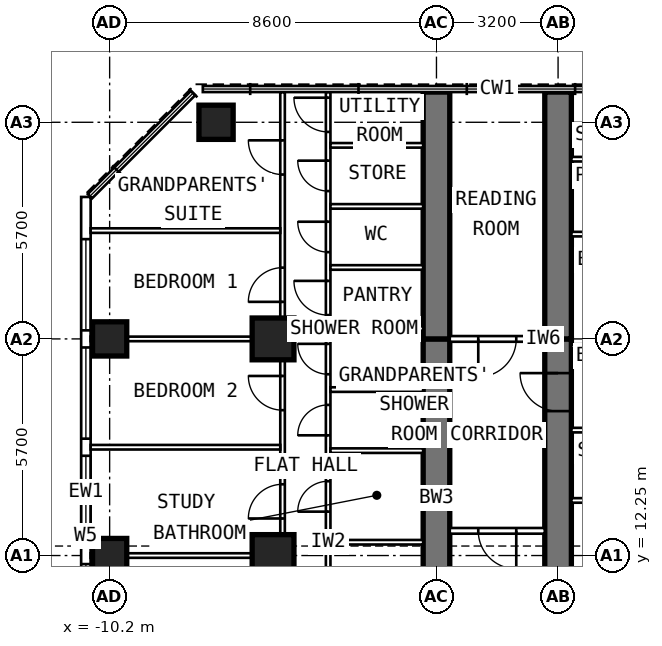
"""IFC4 building model, lengths in metres.
Left out: names, types, materials, properties, quantities, classifications, styles, units other than length and angle.
Written with IfcOpenShell. Run it as: python <this file> out.ifc"""

import sys

from ifc_helpers import new_model, si_unit, direction, frame, frame_2d, origin, origin_2d, place, context, subcontext, project, spatial, rectangle, extrude, element, fill, save


model = new_model("IFC4")
c1 = context("Model", 3, precision=1e-05, world=origin(), true_north=direction((0.0, 1.0)))
c2 = subcontext(c1, "Body", "Model", "MODEL_VIEW")
j1 = project(units=[si_unit("LENGTHUNIT", "METRE"), si_unit("PLANEANGLEUNIT", "RADIAN")], contexts=[c1])
p1 = place(None, origin())
s1 = spatial("IfcSite", under=j1, at=p1, CompositionType="ELEMENT")
p2 = place(p1, origin())
s2 = spatial("IfcBuilding", under=s1, at=p2, CompositionType="ELEMENT")
p3 = place(p2, frame((0.0, 0.0, 222.6)))
s3 = spatial("IfcBuildingStorey", under=s2, at=p3, CompositionType="ELEMENT", Elevation=222.6)
for number, where, z_axis, x_axis in (
    (1, (-10.2, 12.25, 0.0), (0.0, 0.0, 1.0), (0.0, 1.0, 0.0)),
    (2, (-10.2, 17.95, 0.0), (0.0, 0.0, 1.0), (0.0, 1.0, 0.0)),
    (3, (-7.4, 23.65, 0.0), (0.0, 0.0, 1.0), (0.0, 1.0, 0.0)),
):
    element("IfcColumn", number, at=place(p3, frame(where, z_axis=z_axis, x_axis=x_axis)), inside=s3, PredefinedType="COLUMN", context=c2, shape_type="SweptSolid", body=[
        extrude(rectangle(XDim=0.9, YDim=0.9, at=origin_2d()), origin(), (0.0, 0.0, 1.0), 3.6),
    ])
for number, where, z_axis, x_axis in (
    (4, (-5.9, 12.25, 0.0), (0.0, 0.0, 1.0), (0.0, 1.0, 0.0)),
    (5, (-5.9, 17.95, 0.0), (0.0, 0.0, 1.0), (0.0, 1.0, 0.0)),
):
    element("IfcColumn", number, at=place(p3, frame(where, z_axis=z_axis, x_axis=x_axis)), inside=s3, PredefinedType="COLUMN", context=c2, shape_type="SweptSolid", body=[
        extrude(rectangle(XDim=1.1, YDim=1.1, at=origin_2d()), origin(), (0.0, 0.0, 1.0), 3.6),
    ])
p4 = place(p3, frame((-1.6, 9.6, 0.0), z_axis=(0.0, 0.0, 1.0), x_axis=(0.0, 1.0, 0.0)))
e6 = element("IfcWall", 6, at=p4, inside=s3, PredefinedType="SHEAR", context=c2, shape_type="SweptSolid", body=[
    extrude(rectangle(XDim=8.35, YDim=0.7, at=frame_2d((4.175, 0.0))), origin(), (0.0, 0.0, 1.0), 3.6),
])
p5 = place(p4, frame((1.3, 0.0, 0.0)))
e7 = element("IfcOpeningElement", 7, at=p5, cuts=e6, PredefinedType="OPENING", context=c2, shape_type="SweptSolid", body=[
    extrude(rectangle(XDim=1.0, YDim=2.1, at=frame_2d((0.5, 1.05))), frame((0.0, 0.362, 0.0), z_axis=(0.0, -1.0, 0.0), x_axis=(1.0, 0.0, 0.0)), (0.0, 0.0, 1.0), 0.724),
])
p6 = place(p3, frame((-1.6, 17.95, 0.0), z_axis=(0.0, 0.0, 1.0), x_axis=(0.0, 1.0, 0.0)))
e8 = element("IfcWall", 8, at=p6, inside=s3, PredefinedType="SHEAR", context=c2, shape_type="SweptSolid", body=[
    extrude(rectangle(XDim=6.495, YDim=0.7, at=frame_2d((3.248, 0.0))), origin(), (0.0, 0.0, 1.0), 3.6),
])
p7 = place(p3, frame((1.6, 9.6, 0.0), z_axis=(0.0, 0.0, 1.0), x_axis=(0.0, 1.0, 0.0)))
e9 = element("IfcWall", 9, at=p7, inside=s3, PredefinedType="SHEAR", context=c2, shape_type="SweptSolid", body=[
    extrude(rectangle(XDim=8.35, YDim=0.7, at=frame_2d((4.175, 0.0))), origin(), (0.0, 0.0, 1.0), 3.6),
])
p8 = place(p7, frame((6.45, 0.0, 0.0)))
e10 = element("IfcOpeningElement", 10, at=p8, cuts=e9, PredefinedType="OPENING", context=c2, shape_type="SweptSolid", body=[
    extrude(rectangle(XDim=1.0, YDim=2.1, at=frame_2d((0.5, 1.05))), frame((0.0, 0.362, 0.0), z_axis=(0.0, -1.0, 0.0), x_axis=(1.0, 0.0, 0.0)), (0.0, 0.0, 1.0), 0.724),
])
p9 = place(p3, frame((1.6, 17.95, 0.0), z_axis=(0.0, 0.0, 1.0), x_axis=(0.0, 1.0, 0.0)))
e11 = element("IfcWall", 11, at=p9, inside=s3, PredefinedType="SHEAR", context=c2, shape_type="SweptSolid", body=[
    extrude(rectangle(XDim=6.495, YDim=0.7, at=frame_2d((3.248, 0.0))), origin(), (0.0, 0.0, 1.0), 3.6),
])
p10 = place(p3, frame((-10.825, 6.148, 0.0), z_axis=(0.0, 0.0, 1.0), x_axis=(0.0, 1.0, 0.0)))
e12 = element("IfcWall", 12, at=p10, inside=s3, PredefinedType="SOLIDWALL", context=c2, shape_type="SweptSolid", body=[
    extrude(rectangle(XDim=15.537, YDim=0.25, at=frame_2d((7.769, 0.0))), origin(), (0.0, 0.0, 1.0), 3.35),
])
p11 = place(p10, frame((0.627, 0.0, 0.8)))
e13 = element("IfcOpeningElement", 13, at=p11, cuts=e12, PredefinedType="OPENING", context=c2, shape_type="SweptSolid", body=[
    extrude(rectangle(XDim=2.4, YDim=1.8, at=frame_2d((1.2, 0.9))), frame((0.0, 0.137, 0.0), z_axis=(0.0, -1.0, 0.0), x_axis=(1.0, 0.0, 0.0)), (0.0, 0.0, 1.0), 0.274),
])
p12 = place(p10, frame((3.477, 0.0, 0.8)))
e14 = element("IfcOpeningElement", 14, at=p12, cuts=e12, PredefinedType="OPENING", context=c2, shape_type="SweptSolid", body=[
    extrude(rectangle(XDim=2.4, YDim=1.8, at=frame_2d((1.2, 0.9))), frame((0.0, 0.137, 0.0), z_axis=(0.0, -1.0, 0.0), x_axis=(1.0, 0.0, 0.0)), (0.0, 0.0, 1.0), 0.274),
])
p13 = place(p10, frame((6.327, 0.0, 0.8)))
e15 = element("IfcOpeningElement", 15, at=p13, cuts=e12, PredefinedType="OPENING", context=c2, shape_type="SweptSolid", body=[
    extrude(rectangle(XDim=2.4, YDim=1.8, at=frame_2d((1.2, 0.9))), frame((0.0, 0.137, 0.0), z_axis=(0.0, -1.0, 0.0), x_axis=(1.0, 0.0, 0.0)), (0.0, 0.0, 1.0), 0.274),
])
p14 = place(p10, frame((9.177, 0.0, 0.8)))
e16 = element("IfcOpeningElement", 16, at=p14, cuts=e12, PredefinedType="OPENING", context=c2, shape_type="SweptSolid", body=[
    extrude(rectangle(XDim=2.4, YDim=1.8, at=frame_2d((1.2, 0.9))), frame((0.0, 0.137, 0.0), z_axis=(0.0, -1.0, 0.0), x_axis=(1.0, 0.0, 0.0)), (0.0, 0.0, 1.0), 0.274),
])
p15 = place(p10, frame((12.027, 0.0, 0.8)))
e17 = element("IfcOpeningElement", 17, at=p15, cuts=e12, PredefinedType="OPENING", context=c2, shape_type="SweptSolid", body=[
    extrude(rectangle(XDim=2.4, YDim=1.8, at=frame_2d((1.2, 0.9))), frame((0.0, 0.137, 0.0), z_axis=(0.0, -1.0, 0.0), x_axis=(1.0, 0.0, 0.0)), (0.0, 0.0, 1.0), 0.274),
])
p16 = place(p3, frame((-4.45, 9.925, 0.0), z_axis=(0.0, 0.0, 1.0), x_axis=(0.0, 1.0, 0.0)))
e18 = element("IfcWall", 18, at=p16, inside=s3, PredefinedType="PARTITIONING", context=c2, shape_type="SweptSolid", body=[
    extrude(rectangle(XDim=14.52, YDim=0.12, at=frame_2d((7.26, 0.0))), origin(), (0.0, 0.0, 1.0), 3.35),
])
p17 = place(p16, frame((0.925, 0.0, 0.0)))
e19 = element("IfcOpeningElement", 19, at=p17, cuts=e18, PredefinedType="OPENING", context=c2, shape_type="SweptSolid", body=[
    extrude(rectangle(XDim=0.9, YDim=2.1, at=frame_2d((0.45, 1.05))), frame((0.0, 0.072, 0.0), z_axis=(0.0, -1.0, 0.0), x_axis=(1.0, 0.0, 0.0)), (0.0, 0.0, 1.0), 0.144),
])
p18 = place(p16, frame((3.48, 0.0, 0.0)))
e20 = element("IfcOpeningElement", 20, at=p18, cuts=e18, PredefinedType="OPENING", context=c2, shape_type="SweptSolid", body=[
    extrude(rectangle(XDim=0.8, YDim=2.1, at=frame_2d((0.4, 1.05))), frame((0.0, 0.072, 0.0), z_axis=(0.0, -1.0, 0.0), x_axis=(1.0, 0.0, 0.0)), (0.0, 0.0, 1.0), 0.144),
])
p19 = place(p16, frame((5.488, 0.0, 0.0)))
e21 = element("IfcOpeningElement", 21, at=p19, cuts=e18, PredefinedType="OPENING", context=c2, shape_type="SweptSolid", body=[
    extrude(rectangle(XDim=0.8, YDim=2.1, at=frame_2d((0.4, 1.05))), frame((0.0, 0.072, 0.0), z_axis=(0.0, -1.0, 0.0), x_axis=(1.0, 0.0, 0.0)), (0.0, 0.0, 1.0), 0.144),
])
p20 = place(p16, frame((7.095, 0.0, 0.0)))
e22 = element("IfcOpeningElement", 22, at=p20, cuts=e18, PredefinedType="OPENING", context=c2, shape_type="SweptSolid", body=[
    extrude(rectangle(XDim=0.8, YDim=2.1, at=frame_2d((0.4, 1.05))), frame((0.0, 0.072, 0.0), z_axis=(0.0, -1.0, 0.0), x_axis=(1.0, 0.0, 0.0)), (0.0, 0.0, 1.0), 0.144),
])
p21 = place(p16, frame((8.652, 0.0, 0.0)))
e23 = element("IfcOpeningElement", 23, at=p21, cuts=e18, PredefinedType="OPENING", context=c2, shape_type="SweptSolid", body=[
    extrude(rectangle(XDim=0.9, YDim=2.1, at=frame_2d((0.45, 1.05))), frame((0.0, 0.072, 0.0), z_axis=(0.0, -1.0, 0.0), x_axis=(1.0, 0.0, 0.0)), (0.0, 0.0, 1.0), 0.144),
])
p22 = place(p16, frame((10.308, 0.0, 0.0)))
e24 = element("IfcOpeningElement", 24, at=p22, cuts=e18, PredefinedType="OPENING", context=c2, shape_type="SweptSolid", body=[
    extrude(rectangle(XDim=0.8, YDim=2.1, at=frame_2d((0.4, 1.05))), frame((0.0, 0.072, 0.0), z_axis=(0.0, -1.0, 0.0), x_axis=(1.0, 0.0, 0.0)), (0.0, 0.0, 1.0), 0.144),
])
p23 = place(p16, frame((11.915, 0.0, 0.0)))
e25 = element("IfcOpeningElement", 25, at=p23, cuts=e18, PredefinedType="OPENING", context=c2, shape_type="SweptSolid", body=[
    extrude(rectangle(XDim=0.8, YDim=2.1, at=frame_2d((0.4, 1.05))), frame((0.0, 0.072, 0.0), z_axis=(0.0, -1.0, 0.0), x_axis=(1.0, 0.0, 0.0)), (0.0, 0.0, 1.0), 0.144),
])
p24 = place(p16, frame((13.472, 0.0, 0.0)))
e26 = element("IfcOpeningElement", 26, at=p24, cuts=e18, PredefinedType="OPENING", context=c2, shape_type="SweptSolid", body=[
    extrude(rectangle(XDim=0.9, YDim=2.1, at=frame_2d((0.45, 1.05))), frame((0.0, 0.072, 0.0), z_axis=(0.0, -1.0, 0.0), x_axis=(1.0, 0.0, 0.0)), (0.0, 0.0, 1.0), 0.144),
])
p25 = place(p3, frame((-5.65, 9.6, 0.0), z_axis=(0.0, 0.0, 1.0), x_axis=(0.0, 1.0, 0.0)))
e27 = element("IfcWall", 27, at=p25, inside=s3, PredefinedType="PARTITIONING", context=c2, shape_type="SweptSolid", body=[
    extrude(rectangle(XDim=14.845, YDim=0.12, at=frame_2d((7.422, 0.0))), origin(), (0.0, 0.0, 1.0), 3.35),
])
p26 = place(p25, frame((1.05, 0.0, 0.0)))
e28 = element("IfcOpeningElement", 28, at=p26, cuts=e27, PredefinedType="OPENING", context=c2, shape_type="SweptSolid", body=[
    extrude(rectangle(XDim=0.9, YDim=2.1, at=frame_2d((0.45, 1.05))), frame((0.0, 0.072, 0.0), z_axis=(0.0, -1.0, 0.0), x_axis=(1.0, 0.0, 0.0)), (0.0, 0.0, 1.0), 0.144),
])
p27 = place(p25, frame((3.625, 0.0, 0.0)))
e29 = element("IfcOpeningElement", 29, at=p27, cuts=e27, PredefinedType="OPENING", context=c2, shape_type="SweptSolid", body=[
    extrude(rectangle(XDim=0.9, YDim=2.1, at=frame_2d((0.45, 1.05))), frame((0.0, 0.072, 0.0), z_axis=(0.0, -1.0, 0.0), x_axis=(1.0, 0.0, 0.0)), (0.0, 0.0, 1.0), 0.144),
])
p28 = place(p25, frame((6.475, 0.0, 0.0)))
e30 = element("IfcOpeningElement", 30, at=p28, cuts=e27, PredefinedType="OPENING", context=c2, shape_type="SweptSolid", body=[
    extrude(rectangle(XDim=0.9, YDim=2.1, at=frame_2d((0.45, 1.05))), frame((0.0, 0.072, 0.0), z_axis=(0.0, -1.0, 0.0), x_axis=(1.0, 0.0, 0.0)), (0.0, 0.0, 1.0), 0.144),
])
p29 = place(p25, frame((9.325, 0.0, 0.0)))
e31 = element("IfcOpeningElement", 31, at=p29, cuts=e27, PredefinedType="OPENING", context=c2, shape_type="SweptSolid", body=[
    extrude(rectangle(XDim=0.9, YDim=2.1, at=frame_2d((0.45, 1.05))), frame((0.0, 0.072, 0.0), z_axis=(0.0, -1.0, 0.0), x_axis=(1.0, 0.0, 0.0)), (0.0, 0.0, 1.0), 0.144),
])
p30 = place(p25, frame((12.675, 0.0, 0.0)))
e32 = element("IfcOpeningElement", 32, at=p30, cuts=e27, PredefinedType="OPENING", context=c2, shape_type="SweptSolid", body=[
    extrude(rectangle(XDim=0.9, YDim=2.1, at=frame_2d((0.45, 1.05))), frame((0.0, 0.072, 0.0), z_axis=(0.0, -1.0, 0.0), x_axis=(1.0, 0.0, 0.0)), (0.0, 0.0, 1.0), 0.144),
])
p31 = place(p3, frame((-5.71, 12.25, 0.0), z_axis=(0.0, 0.0, 1.0), x_axis=(-1.0, 0.0, 0.0)))
e33 = element("IfcWall", 33, at=p31, inside=s3, PredefinedType="PARTITIONING", context=c2, shape_type="SweptSolid", body=[
    extrude(rectangle(XDim=4.99, YDim=0.12, at=frame_2d((2.495, 0.0))), origin(), (0.0, 0.0, 1.0), 2.45),
])
p32 = place(p3, frame((-5.71, 15.1, 0.0), z_axis=(0.0, 0.0, 1.0), x_axis=(-1.0, 0.0, 0.0)))
e34 = element("IfcWall", 34, at=p32, inside=s3, PredefinedType="PARTITIONING", context=c2, shape_type="SweptSolid", body=[
    extrude(rectangle(XDim=4.99, YDim=0.12, at=frame_2d((2.495, 0.0))), origin(), (0.0, 0.0, 1.0), 3.35),
])
p33 = place(p3, frame((-5.71, 17.95, 0.0), z_axis=(0.0, 0.0, 1.0), x_axis=(-1.0, 0.0, 0.0)))
e35 = element("IfcWall", 35, at=p33, inside=s3, PredefinedType="PARTITIONING", context=c2, shape_type="SweptSolid", body=[
    extrude(rectangle(XDim=4.99, YDim=0.12, at=frame_2d((2.495, 0.0))), origin(), (0.0, 0.0, 1.0), 2.45),
])
p34 = place(p3, frame((-5.71, 20.8, 0.0), z_axis=(0.0, 0.0, 1.0), x_axis=(-1.0, 0.0, 0.0)))
e36 = element("IfcWall", 36, at=p34, inside=s3, PredefinedType="PARTITIONING", context=c2, shape_type="SweptSolid", body=[
    extrude(rectangle(XDim=4.99, YDim=0.12, at=frame_2d((2.495, 0.0))), origin(), (0.0, 0.0, 1.0), 3.35),
])
p35 = place(p3, frame((-1.95, 12.6, 0.0), z_axis=(0.0, 0.0, 1.0), x_axis=(-1.0, 0.0, 0.0)))
e37 = element("IfcWall", 37, at=p35, inside=s3, PredefinedType="PARTITIONING", context=c2, shape_type="SweptSolid", body=[
    extrude(rectangle(XDim=2.44, YDim=0.12, at=frame_2d((1.22, 0.0))), origin(), (0.0, 0.0, 1.0), 2.45),
])
for number, where, z_axis, x_axis in (
    (38, (-1.95, 15.01, 0.0), (0.0, 0.0, 1.0), (-1.0, 0.0, 0.0)),
    (39, (-1.95, 16.617, 0.0), (0.0, 0.0, 1.0), (-1.0, 0.0, 0.0)),
):
    element("IfcWall", number, at=place(p3, frame(where, z_axis=z_axis, x_axis=x_axis)), inside=s3, PredefinedType="PARTITIONING", context=c2, shape_type="SweptSolid", body=[
        extrude(rectangle(XDim=2.44, YDim=0.12, at=frame_2d((1.22, 0.0))), origin(), (0.0, 0.0, 1.0), 3.35),
    ])
p36 = place(p3, frame((-1.95, 18.223, 0.0), z_axis=(0.0, 0.0, 1.0), x_axis=(-1.0, 0.0, 0.0)))
e40 = element("IfcWall", 40, at=p36, inside=s3, PredefinedType="PARTITIONING", context=c2, shape_type="SweptSolid", body=[
    extrude(rectangle(XDim=2.44, YDim=0.12, at=frame_2d((1.22, 0.0))), origin(), (0.0, 0.0, 1.0), 2.45),
])
for number, where, z_axis, x_axis in (
    (41, (-1.95, 19.83, 0.0), (0.0, 0.0, 1.0), (-1.0, 0.0, 0.0)),
    (42, (-1.95, 21.437, 0.0), (0.0, 0.0, 1.0), (-1.0, 0.0, 0.0)),
    (43, (-1.95, 23.043, 0.0), (0.0, 0.0, 1.0), (-1.0, 0.0, 0.0)),
    (44, (1.95, 13.7, 0.0), (0.0, 0.0, 1.0), (1.0, 0.0, 0.0)),
    (45, (1.95, 15.55, 0.0), (0.0, 0.0, 1.0), (1.0, 0.0, 0.0)),
):
    element("IfcWall", number, at=place(p3, frame(where, z_axis=z_axis, x_axis=x_axis)), inside=s3, PredefinedType="PARTITIONING", context=c2, shape_type="SweptSolid", body=[
        extrude(rectangle(XDim=2.44, YDim=0.12, at=frame_2d((1.22, 0.0))), origin(), (0.0, 0.0, 1.0), 3.35),
    ])
p37 = place(p3, frame((1.95, 17.75, 0.0), z_axis=(0.0, 0.0, 1.0), x_axis=(1.0, 0.0, 0.0)))
e46 = element("IfcWall", 46, at=p37, inside=s3, PredefinedType="PARTITIONING", context=c2, shape_type="SweptSolid", body=[
    extrude(rectangle(XDim=2.44, YDim=0.12, at=frame_2d((1.22, 0.0))), origin(), (0.0, 0.0, 1.0), 2.45),
])
for number, where, z_axis, x_axis in (
    (47, (1.95, 20.707, 0.0), (0.0, 0.0, 1.0), (1.0, 0.0, 0.0)),
    (48, (1.95, 22.678, 0.0), (0.0, 0.0, 1.0), (1.0, 0.0, 0.0)),
):
    element("IfcWall", number, at=place(p3, frame(where, z_axis=z_axis, x_axis=x_axis)), inside=s3, PredefinedType="PARTITIONING", context=c2, shape_type="SweptSolid", body=[
        extrude(rectangle(XDim=2.44, YDim=0.12, at=frame_2d((1.22, 0.0))), origin(), (0.0, 0.0, 1.0), 3.35),
    ])
p38 = place(p3, frame((1.25, 17.95, 0.0), z_axis=(0.0, 0.0, 1.0), x_axis=(-1.0, 0.0, 0.0)))
e49 = element("IfcWall", 49, at=p38, inside=s3, PredefinedType="PARTITIONING", context=c2, shape_type="SweptSolid", body=[
    extrude(rectangle(XDim=2.5, YDim=0.15, at=frame_2d((1.25, 0.0))), origin(), (0.0, 0.0, 1.0), 3.35),
])
p39 = place(p38, frame((0.75, 0.0, 0.0)))
e50 = element("IfcOpeningElement", 50, at=p39, cuts=e49, PredefinedType="OPENING", context=c2, shape_type="SweptSolid", body=[
    extrude(rectangle(XDim=1.0, YDim=2.1, at=frame_2d((0.5, 1.05))), frame((0.0, 0.087, 0.0), z_axis=(0.0, -1.0, 0.0), x_axis=(1.0, 0.0, 0.0)), (0.0, 0.0, 1.0), 0.174),
])
p40 = place(p3, frame((1.25, 12.9, 0.0), z_axis=(0.0, 0.0, 1.0), x_axis=(-1.0, 0.0, 0.0)))
e51 = element("IfcWall", 51, at=p40, inside=s3, PredefinedType="PARTITIONING", context=c2, shape_type="SweptSolid", body=[
    extrude(rectangle(XDim=2.5, YDim=0.15, at=frame_2d((1.25, 0.0))), origin(), (0.0, 0.0, 1.0), 3.35),
])
p41 = place(p40, frame((0.75, 0.0, 0.0)))
e52 = element("IfcOpeningElement", 52, at=p41, cuts=e51, PredefinedType="OPENING", context=c2, shape_type="SweptSolid", body=[
    extrude(rectangle(XDim=1.0, YDim=2.1, at=frame_2d((0.5, 1.05))), frame((0.0, 0.087, 0.0), z_axis=(0.0, -1.0, 0.0), x_axis=(1.0, 0.0, 0.0)), (0.0, 0.0, 1.0), 0.174),
])
p42 = place(p12, origin())
e53 = element("IfcWindow", 53, at=p42, inside=s3, PartitioningType="SINGLE_PANEL", PredefinedType="WINDOW", context=c2, shape_type="SweptSolid", body=[
    extrude(rectangle(XDim=2.4, YDim=1.8, at=frame_2d((1.2, 0.9))), frame((0.0, 0.03, 0.0), z_axis=(0.0, -1.0, 0.0), x_axis=(1.0, 0.0, 0.0)), (0.0, 0.0, 1.0), 0.06),
])
fill(e14, e53)
p43 = place(p13, origin())
e54 = element("IfcWindow", 54, at=p43, inside=s3, PartitioningType="SINGLE_PANEL", PredefinedType="WINDOW", context=c2, shape_type="SweptSolid", body=[
    extrude(rectangle(XDim=2.4, YDim=1.8, at=frame_2d((1.2, 0.9))), frame((0.0, 0.03, 0.0), z_axis=(0.0, -1.0, 0.0), x_axis=(1.0, 0.0, 0.0)), (0.0, 0.0, 1.0), 0.06),
])
fill(e15, e54)
p44 = place(p14, origin())
e55 = element("IfcWindow", 55, at=p44, inside=s3, PartitioningType="SINGLE_PANEL", PredefinedType="WINDOW", context=c2, shape_type="SweptSolid", body=[
    extrude(rectangle(XDim=2.4, YDim=1.8, at=frame_2d((1.2, 0.9))), frame((0.0, 0.03, 0.0), z_axis=(0.0, -1.0, 0.0), x_axis=(1.0, 0.0, 0.0)), (0.0, 0.0, 1.0), 0.06),
])
fill(e16, e55)
p45 = place(p15, origin())
e56 = element("IfcWindow", 56, at=p45, inside=s3, PartitioningType="SINGLE_PANEL", PredefinedType="WINDOW", context=c2, shape_type="SweptSolid", body=[
    extrude(rectangle(XDim=2.4, YDim=1.8, at=frame_2d((1.2, 0.9))), frame((0.0, 0.03, 0.0), z_axis=(0.0, -1.0, 0.0), x_axis=(1.0, 0.0, 0.0)), (0.0, 0.0, 1.0), 0.06),
])
fill(e17, e56)
p46 = place(p27, origin())
e57 = element("IfcDoor", 57, at=p46, inside=s3, OperationType="SINGLE_SWING_LEFT", PredefinedType="DOOR", context=c2, shape_type="SweptSolid", body=[
    extrude(rectangle(XDim=0.9, YDim=2.1, at=frame_2d((0.45, 1.05))), frame((0.0, 0.025, 0.0), z_axis=(0.0, -1.0, 0.0), x_axis=(1.0, 0.0, 0.0)), (0.0, 0.0, 1.0), 0.05),
])
fill(e29, e57)
p47 = place(p28, origin())
e58 = element("IfcDoor", 58, at=p47, inside=s3, OperationType="SINGLE_SWING_RIGHT", PredefinedType="DOOR", context=c2, shape_type="SweptSolid", body=[
    extrude(rectangle(XDim=0.9, YDim=2.1, at=frame_2d((0.45, 1.05))), frame((0.0, 0.025, 0.0), z_axis=(0.0, -1.0, 0.0), x_axis=(1.0, 0.0, 0.0)), (0.0, 0.0, 1.0), 0.05),
])
fill(e30, e58)
p48 = place(p29, origin())
e59 = element("IfcDoor", 59, at=p48, inside=s3, OperationType="SINGLE_SWING_LEFT", PredefinedType="DOOR", context=c2, shape_type="SweptSolid", body=[
    extrude(rectangle(XDim=0.9, YDim=2.1, at=frame_2d((0.45, 1.05))), frame((0.0, 0.025, 0.0), z_axis=(0.0, -1.0, 0.0), x_axis=(1.0, 0.0, 0.0)), (0.0, 0.0, 1.0), 0.05),
])
fill(e31, e59)
p49 = place(p30, origin())
e60 = element("IfcDoor", 60, at=p49, inside=s3, OperationType="SINGLE_SWING_RIGHT", PredefinedType="DOOR", context=c2, shape_type="SweptSolid", body=[
    extrude(rectangle(XDim=0.9, YDim=2.1, at=frame_2d((0.45, 1.05))), frame((0.0, 0.025, 0.0), z_axis=(0.0, -1.0, 0.0), x_axis=(1.0, 0.0, 0.0)), (0.0, 0.0, 1.0), 0.05),
])
fill(e32, e60)
p50 = place(p18, origin())
e61 = element("IfcDoor", 61, at=p50, inside=s3, OperationType="SINGLE_SWING_LEFT", PredefinedType="DOOR", context=c2, shape_type="SweptSolid", body=[
    extrude(rectangle(XDim=0.8, YDim=2.1, at=frame_2d((0.4, 1.05))), frame((0.0, 0.025, 0.0), z_axis=(0.0, -1.0, 0.0), x_axis=(1.0, 0.0, 0.0)), (0.0, 0.0, 1.0), 0.05),
])
fill(e20, e61)
p51 = place(p19, origin())
e62 = element("IfcDoor", 62, at=p51, inside=s3, OperationType="SINGLE_SWING_LEFT", PredefinedType="DOOR", context=c2, shape_type="SweptSolid", body=[
    extrude(rectangle(XDim=0.8, YDim=2.1, at=frame_2d((0.4, 1.05))), frame((0.0, 0.025, 0.0), z_axis=(0.0, -1.0, 0.0), x_axis=(1.0, 0.0, 0.0)), (0.0, 0.0, 1.0), 0.05),
])
fill(e21, e62)
p52 = place(p20, origin())
e63 = element("IfcDoor", 63, at=p52, inside=s3, OperationType="SINGLE_SWING_RIGHT", PredefinedType="DOOR", context=c2, shape_type="SweptSolid", body=[
    extrude(rectangle(XDim=0.8, YDim=2.1, at=frame_2d((0.4, 1.05))), frame((0.0, 0.025, 0.0), z_axis=(0.0, -1.0, 0.0), x_axis=(1.0, 0.0, 0.0)), (0.0, 0.0, 1.0), 0.05),
])
fill(e22, e63)
p53 = place(p21, origin())
e64 = element("IfcDoor", 64, at=p53, inside=s3, OperationType="SINGLE_SWING_RIGHT", PredefinedType="DOOR", context=c2, shape_type="SweptSolid", body=[
    extrude(rectangle(XDim=0.9, YDim=2.1, at=frame_2d((0.45, 1.05))), frame((0.0, 0.025, 0.0), z_axis=(0.0, -1.0, 0.0), x_axis=(1.0, 0.0, 0.0)), (0.0, 0.0, 1.0), 0.05),
])
fill(e23, e64)
p54 = place(p22, origin())
e65 = element("IfcDoor", 65, at=p54, inside=s3, OperationType="SINGLE_SWING_RIGHT", PredefinedType="DOOR", context=c2, shape_type="SweptSolid", body=[
    extrude(rectangle(XDim=0.8, YDim=2.1, at=frame_2d((0.4, 1.05))), frame((0.0, 0.025, 0.0), z_axis=(0.0, -1.0, 0.0), x_axis=(1.0, 0.0, 0.0)), (0.0, 0.0, 1.0), 0.05),
])
fill(e24, e65)
p55 = place(p23, origin())
e66 = element("IfcDoor", 66, at=p55, inside=s3, OperationType="SINGLE_SWING_RIGHT", PredefinedType="DOOR", context=c2, shape_type="SweptSolid", body=[
    extrude(rectangle(XDim=0.8, YDim=2.1, at=frame_2d((0.4, 1.05))), frame((0.0, 0.025, 0.0), z_axis=(0.0, -1.0, 0.0), x_axis=(1.0, 0.0, 0.0)), (0.0, 0.0, 1.0), 0.05),
])
fill(e25, e66)
p56 = place(p24, origin())
e67 = element("IfcDoor", 67, at=p56, inside=s3, OperationType="SINGLE_SWING_RIGHT", PredefinedType="DOOR", context=c2, shape_type="SweptSolid", body=[
    extrude(rectangle(XDim=0.9, YDim=2.1, at=frame_2d((0.45, 1.05))), frame((0.0, 0.025, 0.0), z_axis=(0.0, -1.0, 0.0), x_axis=(1.0, 0.0, 0.0)), (0.0, 0.0, 1.0), 0.05),
])
fill(e26, e67)
p57 = place(p8, origin())
e68 = element("IfcDoor", 68, at=p57, inside=s3, OperationType="SINGLE_SWING_RIGHT", PredefinedType="DOOR", context=c2, shape_type="SweptSolid", body=[
    extrude(rectangle(XDim=1.0, YDim=2.1, at=frame_2d((0.5, 1.05))), frame((0.0, 0.1, 0.0), z_axis=(0.0, -1.0, 0.0), x_axis=(1.0, 0.0, 0.0)), (0.0, 0.0, 1.0), 0.2),
])
fill(e10, e68)
p58 = place(p39, origin())
e69 = element("IfcDoor", 69, at=p58, inside=s3, OperationType="SINGLE_SWING_RIGHT", PredefinedType="DOOR", context=c2, shape_type="SweptSolid", body=[
    extrude(rectangle(XDim=1.0, YDim=2.1, at=frame_2d((0.5, 1.05))), frame((0.0, 0.025, 0.0), z_axis=(0.0, -1.0, 0.0), x_axis=(1.0, 0.0, 0.0)), (0.0, 0.0, 1.0), 0.05),
])
fill(e50, e69)
p59 = place(p41, origin())
e70 = element("IfcDoor", 70, at=p59, inside=s3, OperationType="SINGLE_SWING_LEFT", PredefinedType="DOOR", context=c2, shape_type="SweptSolid", body=[
    extrude(rectangle(XDim=1.0, YDim=2.1, at=frame_2d((0.5, 1.05))), frame((0.0, 0.025, 0.0), z_axis=(0.0, -1.0, 0.0), x_axis=(1.0, 0.0, 0.0)), (0.0, 0.0, 1.0), 0.05),
])
fill(e52, e70)
save(model, sys.argv[1])
